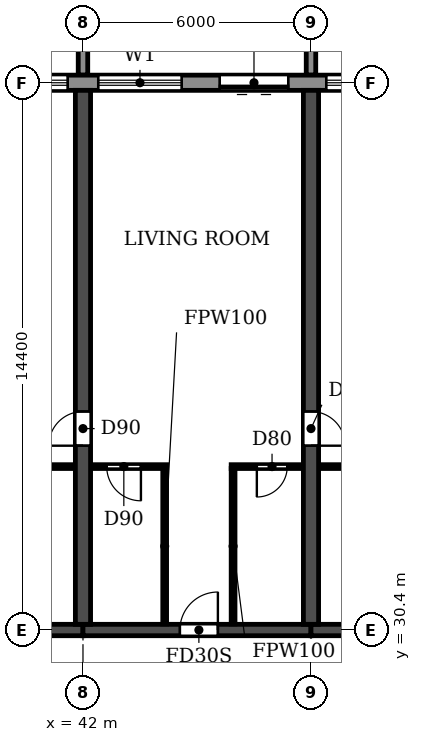
"""IFC4 building model, lengths in metres.
Left out: names, types, materials, properties, quantities, classifications, styles, units other than length and angle.
Written with IfcOpenShell. Run it as: python <this file> out.ifc"""

import sys

from ifc_helpers import new_model, si_unit, direction, frame, frame_2d, origin, place, context, subcontext, project, spatial, polyline, rectangle, outline, extrude, source, transform, mapped, element, fill, save


model = new_model("IFC4")
c1 = context("Model", 3, precision=1e-05, world=origin(), true_north=direction((0.0, 1.0)))
c2 = subcontext(c1, "Body", "Model", "MODEL_VIEW")
j1 = project(units=[si_unit("LENGTHUNIT", "METRE"), si_unit("PLANEANGLEUNIT", "RADIAN")], contexts=[c1])
p1 = place(None, origin())
s1 = spatial("IfcSite", under=j1, at=p1, CompositionType="ELEMENT")
p2 = place(p1, origin())
s2 = spatial("IfcBuilding", under=s1, at=p2, CompositionType="ELEMENT")
p3 = place(p2, frame((0.0, 0.0, 43.2)))
s3 = spatial("IfcBuildingStorey", under=s2, at=p3, CompositionType="ELEMENT", Elevation=43.2)
p4 = place(p3, frame((42.0, 30.55, 0.0), z_axis=(0.0, 0.0, 1.0), x_axis=(0.0, 1.0, 0.0)))
e1 = element("IfcWall", 1, at=p4, inside=s3, PredefinedType="SHEAR", context=c2, shape_type="SweptSolid", body=[
    extrude(rectangle(XDim=14.05, YDim=0.4, at=frame_2d((7.025, 0.0))), origin(), (0.0, 0.0, 1.0), 3.05),
])
p5 = place(p4, frame((4.7, 0.0, 0.0)))
e2 = element("IfcOpeningElement", 2, at=p5, cuts=e1, PredefinedType="OPENING", context=c2, shape_type="SweptSolid", body=[
    extrude(rectangle(XDim=0.9, YDim=2.1, at=frame_2d((0.45, 1.05))), frame((0.0, 0.21, 0.0), z_axis=(0.0, -1.0, 0.0), x_axis=(1.0, 0.0, 0.0)), (0.0, 0.0, 1.0), 0.42),
])
p6 = place(p3, frame((48.0, 30.55, 0.0), z_axis=(0.0, 0.0, 1.0), x_axis=(0.0, 1.0, 0.0)))
e3 = element("IfcWall", 3, at=p6, inside=s3, PredefinedType="SHEAR", context=c2, shape_type="SweptSolid", body=[
    extrude(rectangle(XDim=14.05, YDim=0.4, at=frame_2d((7.025, 0.0))), origin(), (0.0, 0.0, 1.0), 3.05),
])
p7 = place(p6, frame((4.7, 0.0, 0.0)))
e4 = element("IfcOpeningElement", 4, at=p7, cuts=e3, PredefinedType="OPENING", context=c2, shape_type="SweptSolid", body=[
    extrude(rectangle(XDim=0.9, YDim=2.1, at=frame_2d((0.45, 1.05))), frame((0.0, 0.21, 0.0), z_axis=(0.0, -1.0, 0.0), x_axis=(1.0, 0.0, 0.0)), (0.0, 0.0, 1.0), 0.42),
])
p8 = place(p3, frame((36.0, 30.4, 0.0), z_axis=(0.0, 0.0, 1.0), x_axis=(1.0, 0.0, 0.0)))
e5 = element("IfcWall", 5, at=p8, inside=s3, PredefinedType="SHEAR", context=c2, shape_type="SweptSolid", body=[
    extrude(rectangle(XDim=6.0, YDim=0.3, at=frame_2d((3.0, 0.0))), origin(), (0.0, 0.0, 1.0), 2.45),
])
p9 = place(p3, frame((42.0, 30.4, 0.0), z_axis=(0.0, 0.0, 1.0), x_axis=(1.0, 0.0, 0.0)))
e6 = element("IfcWall", 6, at=p9, inside=s3, PredefinedType="SHEAR", context=c2, shape_type="SweptSolid", body=[
    extrude(rectangle(XDim=6.0, YDim=0.3, at=frame_2d((3.0, 0.0))), origin(), (0.0, 0.0, 1.0), 2.45),
])
p10 = place(p9, frame((2.55, 0.0, 0.0)))
e7 = element("IfcOpeningElement", 7, at=p10, cuts=e6, PredefinedType="OPENING", context=c2, shape_type="SweptSolid", body=[
    extrude(rectangle(XDim=1.0, YDim=2.1, at=frame_2d((0.5, 1.05))), frame((0.0, 0.16, 0.0), z_axis=(0.0, -1.0, 0.0), x_axis=(1.0, 0.0, 0.0)), (0.0, 0.0, 1.0), 0.32),
])
p11 = place(p3, frame((48.0, 30.4, 0.0), z_axis=(0.0, 0.0, 1.0), x_axis=(1.0, 0.0, 0.0)))
e8 = element("IfcWall", 8, at=p11, inside=s3, PredefinedType="SHEAR", context=c2, shape_type="SweptSolid", body=[
    extrude(rectangle(XDim=6.0, YDim=0.3, at=frame_2d((3.0, 0.0))), origin(), (0.0, 0.0, 1.0), 2.45),
])
p12 = place(p3, frame((97.317, 44.8, 0.0), z_axis=(0.0, 0.0, 1.0), x_axis=(-1.0, 0.0, 0.0)))
e9 = element("IfcWall", 9, at=p12, inside=s3, PredefinedType="STANDARD", context=c2, shape_type="SweptSolid", body=[
    extrude(rectangle(XDim=92.634, YDim=0.4, at=frame_2d((46.317, 0.0))), origin(), (0.0, 0.0, 1.0), 3.05),
])
p13 = place(p12, frame((88.917, 0.0, 0.0)))
e10 = element("IfcOpeningElement", 10, at=p13, cuts=e9, PredefinedType="OPENING", context=c2, shape_type="SweptSolid", body=[
    extrude(rectangle(XDim=1.8, YDim=2.4, at=frame_2d((0.9, 1.2))), frame((0.0, 0.21, 0.0), z_axis=(0.0, -1.0, 0.0), x_axis=(1.0, 0.0, 0.0)), (0.0, 0.0, 1.0), 0.42),
])
p14 = place(p12, frame((85.717, 0.0, 0.9)))
e11 = element("IfcOpeningElement", 11, at=p14, cuts=e9, PredefinedType="OPENING", context=c2, shape_type="SweptSolid", body=[
    extrude(rectangle(XDim=2.2, YDim=1.5, at=frame_2d((1.1, 0.75))), frame((0.0, 0.21, 0.0), z_axis=(0.0, -1.0, 0.0), x_axis=(1.0, 0.0, 0.0)), (0.0, 0.0, 1.0), 0.42),
])
p15 = place(p12, frame((82.717, 0.0, 0.9)))
e12 = element("IfcOpeningElement", 12, at=p15, cuts=e9, PredefinedType="OPENING", context=c2, shape_type="SweptSolid", body=[
    extrude(rectangle(XDim=2.2, YDim=1.5, at=frame_2d((1.1, 0.75))), frame((0.0, 0.21, 0.0), z_axis=(0.0, -1.0, 0.0), x_axis=(1.0, 0.0, 0.0)), (0.0, 0.0, 1.0), 0.42),
])
p16 = place(p12, frame((79.717, 0.0, 0.9)))
e13 = element("IfcOpeningElement", 13, at=p16, cuts=e9, PredefinedType="OPENING", context=c2, shape_type="SweptSolid", body=[
    extrude(rectangle(XDim=2.2, YDim=1.5, at=frame_2d((1.1, 0.75))), frame((0.0, 0.21, 0.0), z_axis=(0.0, -1.0, 0.0), x_axis=(1.0, 0.0, 0.0)), (0.0, 0.0, 1.0), 0.42),
])
p17 = place(p12, frame((76.717, 0.0, 0.9)))
e14 = element("IfcOpeningElement", 14, at=p17, cuts=e9, PredefinedType="OPENING", context=c2, shape_type="SweptSolid", body=[
    extrude(rectangle(XDim=2.2, YDim=1.5, at=frame_2d((1.1, 0.75))), frame((0.0, 0.21, 0.0), z_axis=(0.0, -1.0, 0.0), x_axis=(1.0, 0.0, 0.0)), (0.0, 0.0, 1.0), 0.42),
])
p18 = place(p12, frame((73.917, 0.0, 0.0)))
e15 = element("IfcOpeningElement", 15, at=p18, cuts=e9, PredefinedType="OPENING", context=c2, shape_type="SweptSolid", body=[
    extrude(rectangle(XDim=1.8, YDim=2.4, at=frame_2d((0.9, 1.2))), frame((0.0, 0.21, 0.0), z_axis=(0.0, -1.0, 0.0), x_axis=(1.0, 0.0, 0.0)), (0.0, 0.0, 1.0), 0.42),
])
p19 = place(p12, frame((70.717, 0.0, 0.9)))
e16 = element("IfcOpeningElement", 16, at=p19, cuts=e9, PredefinedType="OPENING", context=c2, shape_type="SweptSolid", body=[
    extrude(rectangle(XDim=2.2, YDim=1.5, at=frame_2d((1.1, 0.75))), frame((0.0, 0.21, 0.0), z_axis=(0.0, -1.0, 0.0), x_axis=(1.0, 0.0, 0.0)), (0.0, 0.0, 1.0), 0.42),
])
p20 = place(p12, frame((67.717, 0.0, 0.9)))
e17 = element("IfcOpeningElement", 17, at=p20, cuts=e9, PredefinedType="OPENING", context=c2, shape_type="SweptSolid", body=[
    extrude(rectangle(XDim=2.2, YDim=1.5, at=frame_2d((1.1, 0.75))), frame((0.0, 0.21, 0.0), z_axis=(0.0, -1.0, 0.0), x_axis=(1.0, 0.0, 0.0)), (0.0, 0.0, 1.0), 0.42),
])
p21 = place(p12, frame((64.717, 0.0, 0.9)))
e18 = element("IfcOpeningElement", 18, at=p21, cuts=e9, PredefinedType="OPENING", context=c2, shape_type="SweptSolid", body=[
    extrude(rectangle(XDim=2.2, YDim=1.5, at=frame_2d((1.1, 0.75))), frame((0.0, 0.21, 0.0), z_axis=(0.0, -1.0, 0.0), x_axis=(1.0, 0.0, 0.0)), (0.0, 0.0, 1.0), 0.42),
])
p22 = place(p12, frame((61.917, 0.0, 0.0)))
e19 = element("IfcOpeningElement", 19, at=p22, cuts=e9, PredefinedType="OPENING", context=c2, shape_type="SweptSolid", body=[
    extrude(rectangle(XDim=1.8, YDim=2.4, at=frame_2d((0.9, 1.2))), frame((0.0, 0.21, 0.0), z_axis=(0.0, -1.0, 0.0), x_axis=(1.0, 0.0, 0.0)), (0.0, 0.0, 1.0), 0.42),
])
p23 = place(p12, frame((58.717, 0.0, 0.9)))
e20 = element("IfcOpeningElement", 20, at=p23, cuts=e9, PredefinedType="OPENING", context=c2, shape_type="SweptSolid", body=[
    extrude(rectangle(XDim=2.2, YDim=1.5, at=frame_2d((1.1, 0.75))), frame((0.0, 0.21, 0.0), z_axis=(0.0, -1.0, 0.0), x_axis=(1.0, 0.0, 0.0)), (0.0, 0.0, 1.0), 0.42),
])
p24 = place(p12, frame((55.717, 0.0, 0.9)))
e21 = element("IfcOpeningElement", 21, at=p24, cuts=e9, PredefinedType="OPENING", context=c2, shape_type="SweptSolid", body=[
    extrude(rectangle(XDim=2.2, YDim=1.5, at=frame_2d((1.1, 0.75))), frame((0.0, 0.21, 0.0), z_axis=(0.0, -1.0, 0.0), x_axis=(1.0, 0.0, 0.0)), (0.0, 0.0, 1.0), 0.42),
])
p25 = place(p12, frame((52.717, 0.0, 0.9)))
e22 = element("IfcOpeningElement", 22, at=p25, cuts=e9, PredefinedType="OPENING", context=c2, shape_type="SweptSolid", body=[
    extrude(rectangle(XDim=2.2, YDim=1.5, at=frame_2d((1.1, 0.75))), frame((0.0, 0.21, 0.0), z_axis=(0.0, -1.0, 0.0), x_axis=(1.0, 0.0, 0.0)), (0.0, 0.0, 1.0), 0.42),
])
p26 = place(p12, frame((49.917, 0.0, 0.0)))
e23 = element("IfcOpeningElement", 23, at=p26, cuts=e9, PredefinedType="OPENING", context=c2, shape_type="SweptSolid", body=[
    extrude(rectangle(XDim=1.8, YDim=2.4, at=frame_2d((0.9, 1.2))), frame((0.0, 0.21, 0.0), z_axis=(0.0, -1.0, 0.0), x_axis=(1.0, 0.0, 0.0)), (0.0, 0.0, 1.0), 0.42),
])
p27 = place(p12, frame((46.717, 0.0, 0.9)))
e24 = element("IfcOpeningElement", 24, at=p27, cuts=e9, PredefinedType="OPENING", context=c2, shape_type="SweptSolid", body=[
    extrude(rectangle(XDim=2.2, YDim=1.5, at=frame_2d((1.1, 0.75))), frame((0.0, 0.21, 0.0), z_axis=(0.0, -1.0, 0.0), x_axis=(1.0, 0.0, 0.0)), (0.0, 0.0, 1.0), 0.42),
])
p28 = place(p12, frame((43.717, 0.0, 0.9)))
e25 = element("IfcOpeningElement", 25, at=p28, cuts=e9, PredefinedType="OPENING", context=c2, shape_type="SweptSolid", body=[
    extrude(rectangle(XDim=2.2, YDim=1.5, at=frame_2d((1.1, 0.75))), frame((0.0, 0.21, 0.0), z_axis=(0.0, -1.0, 0.0), x_axis=(1.0, 0.0, 0.0)), (0.0, 0.0, 1.0), 0.42),
])
p29 = place(p12, frame((40.717, 0.0, 0.9)))
e26 = element("IfcOpeningElement", 26, at=p29, cuts=e9, PredefinedType="OPENING", context=c2, shape_type="SweptSolid", body=[
    extrude(rectangle(XDim=2.2, YDim=1.5, at=frame_2d((1.1, 0.75))), frame((0.0, 0.21, 0.0), z_axis=(0.0, -1.0, 0.0), x_axis=(1.0, 0.0, 0.0)), (0.0, 0.0, 1.0), 0.42),
])
p30 = place(p12, frame((37.917, 0.0, 0.0)))
e27 = element("IfcOpeningElement", 27, at=p30, cuts=e9, PredefinedType="OPENING", context=c2, shape_type="SweptSolid", body=[
    extrude(rectangle(XDim=1.8, YDim=2.4, at=frame_2d((0.9, 1.2))), frame((0.0, 0.21, 0.0), z_axis=(0.0, -1.0, 0.0), x_axis=(1.0, 0.0, 0.0)), (0.0, 0.0, 1.0), 0.42),
])
p31 = place(p12, frame((34.717, 0.0, 0.9)))
e28 = element("IfcOpeningElement", 28, at=p31, cuts=e9, PredefinedType="OPENING", context=c2, shape_type="SweptSolid", body=[
    extrude(rectangle(XDim=2.2, YDim=1.5, at=frame_2d((1.1, 0.75))), frame((0.0, 0.21, 0.0), z_axis=(0.0, -1.0, 0.0), x_axis=(1.0, 0.0, 0.0)), (0.0, 0.0, 1.0), 0.42),
])
p32 = place(p12, frame((31.717, 0.0, 0.9)))
e29 = element("IfcOpeningElement", 29, at=p32, cuts=e9, PredefinedType="OPENING", context=c2, shape_type="SweptSolid", body=[
    extrude(rectangle(XDim=2.2, YDim=1.5, at=frame_2d((1.1, 0.75))), frame((0.0, 0.21, 0.0), z_axis=(0.0, -1.0, 0.0), x_axis=(1.0, 0.0, 0.0)), (0.0, 0.0, 1.0), 0.42),
])
p33 = place(p12, frame((28.717, 0.0, 0.9)))
e30 = element("IfcOpeningElement", 30, at=p33, cuts=e9, PredefinedType="OPENING", context=c2, shape_type="SweptSolid", body=[
    extrude(rectangle(XDim=2.2, YDim=1.5, at=frame_2d((1.1, 0.75))), frame((0.0, 0.21, 0.0), z_axis=(0.0, -1.0, 0.0), x_axis=(1.0, 0.0, 0.0)), (0.0, 0.0, 1.0), 0.42),
])
p34 = place(p12, frame((25.917, 0.0, 0.0)))
e31 = element("IfcOpeningElement", 31, at=p34, cuts=e9, PredefinedType="OPENING", context=c2, shape_type="SweptSolid", body=[
    extrude(rectangle(XDim=1.8, YDim=2.4, at=frame_2d((0.9, 1.2))), frame((0.0, 0.21, 0.0), z_axis=(0.0, -1.0, 0.0), x_axis=(1.0, 0.0, 0.0)), (0.0, 0.0, 1.0), 0.42),
])
p35 = place(p12, frame((22.917, 0.0, 0.0)))
e32 = element("IfcOpeningElement", 32, at=p35, cuts=e9, PredefinedType="OPENING", context=c2, shape_type="SweptSolid", body=[
    extrude(rectangle(XDim=1.8, YDim=2.4, at=frame_2d((0.9, 1.2))), frame((0.0, 0.21, 0.0), z_axis=(0.0, -1.0, 0.0), x_axis=(1.0, 0.0, 0.0)), (0.0, 0.0, 1.0), 0.42),
])
p36 = place(p12, frame((19.717, 0.0, 0.9)))
e33 = element("IfcOpeningElement", 33, at=p36, cuts=e9, PredefinedType="OPENING", context=c2, shape_type="SweptSolid", body=[
    extrude(rectangle(XDim=2.2, YDim=1.5, at=frame_2d((1.1, 0.75))), frame((0.0, 0.21, 0.0), z_axis=(0.0, -1.0, 0.0), x_axis=(1.0, 0.0, 0.0)), (0.0, 0.0, 1.0), 0.42),
])
p37 = place(p12, frame((16.717, 0.0, 0.9)))
e34 = element("IfcOpeningElement", 34, at=p37, cuts=e9, PredefinedType="OPENING", context=c2, shape_type="SweptSolid", body=[
    extrude(rectangle(XDim=2.2, YDim=1.5, at=frame_2d((1.1, 0.75))), frame((0.0, 0.21, 0.0), z_axis=(0.0, -1.0, 0.0), x_axis=(1.0, 0.0, 0.0)), (0.0, 0.0, 1.0), 0.42),
])
p38 = place(p12, frame((13.717, 0.0, 0.9)))
e35 = element("IfcOpeningElement", 35, at=p38, cuts=e9, PredefinedType="OPENING", context=c2, shape_type="SweptSolid", body=[
    extrude(rectangle(XDim=2.2, YDim=1.5, at=frame_2d((1.1, 0.75))), frame((0.0, 0.21, 0.0), z_axis=(0.0, -1.0, 0.0), x_axis=(1.0, 0.0, 0.0)), (0.0, 0.0, 1.0), 0.42),
])
p39 = place(p12, frame((10.717, 0.0, 0.9)))
e36 = element("IfcOpeningElement", 36, at=p39, cuts=e9, PredefinedType="OPENING", context=c2, shape_type="SweptSolid", body=[
    extrude(rectangle(XDim=2.2, YDim=1.5, at=frame_2d((1.1, 0.75))), frame((0.0, 0.21, 0.0), z_axis=(0.0, -1.0, 0.0), x_axis=(1.0, 0.0, 0.0)), (0.0, 0.0, 1.0), 0.42),
])
p40 = place(p12, frame((7.917, 0.0, 0.0)))
e37 = element("IfcOpeningElement", 37, at=p40, cuts=e9, PredefinedType="OPENING", context=c2, shape_type="SweptSolid", body=[
    extrude(rectangle(XDim=1.8, YDim=2.4, at=frame_2d((0.9, 1.2))), frame((0.0, 0.21, 0.0), z_axis=(0.0, -1.0, 0.0), x_axis=(1.0, 0.0, 0.0)), (0.0, 0.0, 1.0), 0.42),
])
p41 = place(p12, frame((4.717, 0.0, 0.9)))
e38 = element("IfcOpeningElement", 38, at=p41, cuts=e9, PredefinedType="OPENING", context=c2, shape_type="SweptSolid", body=[
    extrude(rectangle(XDim=2.2, YDim=1.5, at=frame_2d((1.1, 0.75))), frame((0.0, 0.21, 0.0), z_axis=(0.0, -1.0, 0.0), x_axis=(1.0, 0.0, 0.0)), (0.0, 0.0, 1.0), 0.42),
])
p42 = place(p12, frame((1.917, 0.0, 0.0)))
e39 = element("IfcOpeningElement", 39, at=p42, cuts=e9, PredefinedType="OPENING", context=c2, shape_type="SweptSolid", body=[
    extrude(rectangle(XDim=1.8, YDim=2.4, at=frame_2d((0.9, 1.2))), frame((0.0, 0.21, 0.0), z_axis=(0.0, -1.0, 0.0), x_axis=(1.0, 0.0, 0.0)), (0.0, 0.0, 1.0), 0.42),
])
m1 = source(origin(), c2, "Body", "SweptSolid", [
    extrude(outline(polyline([(0.0, 0.0), (0.25, 0.0), (0.25, 3.1), (0.0, 3.1), (0.0, 0.0)])), origin(), (0.0, 0.0, 1.0), 3.1),
])
for number, where in (
    (40, (41.875, 45.0, 0.0)),
    (41, (47.875, 45.0, 0.0)),
):
    element("IfcWall", number, at=place(p3, frame(where)), inside=s3, PredefinedType="STANDARD", context=c2, shape_type="MappedRepresentation", body=[
        mapped(m1, transform((0.0, 0.0, 0.0))),
    ])
p43 = place(p3, frame((39.1, 34.7, 0.0), z_axis=(0.0, 0.0, 1.0), x_axis=(1.0, 0.0, 0.0)))
e42 = element("IfcWall", 42, at=p43, inside=s3, PredefinedType="PARTITIONING", context=c2, shape_type="SweptSolid", body=[
    extrude(rectangle(XDim=2.69, YDim=0.1, at=frame_2d((1.345, 0.0))), origin(), (0.0, 0.0, 1.0), 3.05),
])
p44 = place(p43, frame((1.0, 0.0, 0.0)))
e43 = element("IfcOpeningElement", 43, at=p44, cuts=e42, PredefinedType="OPENING", context=c2, shape_type="SweptSolid", body=[
    extrude(rectangle(XDim=0.8, YDim=2.1, at=frame_2d((0.4, 1.05))), frame((0.0, 0.06, 0.0), z_axis=(0.0, -1.0, 0.0), x_axis=(1.0, 0.0, 0.0)), (0.0, 0.0, 1.0), 0.12),
])
p45 = place(p3, frame((42.21, 34.7, 0.0), z_axis=(0.0, 0.0, 1.0), x_axis=(1.0, 0.0, 0.0)))
e44 = element("IfcWall", 44, at=p45, inside=s3, PredefinedType="PARTITIONING", context=c2, shape_type="SweptSolid", body=[
    extrude(rectangle(XDim=1.99, YDim=0.1, at=frame_2d((0.995, 0.0))), origin(), (0.0, 0.0, 1.0), 3.05),
])
p46 = place(p45, frame((0.415, 0.0, 0.0)))
e45 = element("IfcOpeningElement", 45, at=p46, cuts=e44, PredefinedType="OPENING", context=c2, shape_type="SweptSolid", body=[
    extrude(rectangle(XDim=0.9, YDim=2.1, at=frame_2d((0.45, 1.05))), frame((0.0, 0.06, 0.0), z_axis=(0.0, -1.0, 0.0), x_axis=(1.0, 0.0, 0.0)), (0.0, 0.0, 1.0), 0.12),
])
p47 = place(p3, frame((45.9, 34.7, 0.0), z_axis=(0.0, 0.0, 1.0), x_axis=(1.0, 0.0, 0.0)))
e46 = element("IfcWall", 46, at=p47, inside=s3, PredefinedType="PARTITIONING", context=c2, shape_type="SweptSolid", body=[
    extrude(rectangle(XDim=1.89, YDim=0.1, at=frame_2d((0.945, 0.0))), origin(), (0.0, 0.0, 1.0), 3.05),
])
p48 = place(p47, frame((0.675, 0.0, 0.0)))
e47 = element("IfcOpeningElement", 47, at=p48, cuts=e46, PredefinedType="OPENING", context=c2, shape_type="SweptSolid", body=[
    extrude(rectangle(XDim=0.8, YDim=2.1, at=frame_2d((0.4, 1.05))), frame((0.0, 0.06, 0.0), z_axis=(0.0, -1.0, 0.0), x_axis=(1.0, 0.0, 0.0)), (0.0, 0.0, 1.0), 0.12),
])
p49 = place(p3, frame((48.21, 34.7, 0.0), z_axis=(0.0, 0.0, 1.0), x_axis=(1.0, 0.0, 0.0)))
e48 = element("IfcWall", 48, at=p49, inside=s3, PredefinedType="PARTITIONING", context=c2, shape_type="SweptSolid", body=[
    extrude(rectangle(XDim=2.69, YDim=0.1, at=frame_2d((1.345, 0.0))), origin(), (0.0, 0.0, 1.0), 3.05),
])
p50 = place(p49, frame((0.89, 0.0, 0.0)))
e49 = element("IfcOpeningElement", 49, at=p50, cuts=e48, PredefinedType="OPENING", context=c2, shape_type="SweptSolid", body=[
    extrude(rectangle(XDim=0.8, YDim=2.1, at=frame_2d((0.4, 1.05))), frame((0.0, 0.06, 0.0), z_axis=(0.0, -1.0, 0.0), x_axis=(1.0, 0.0, 0.0)), (0.0, 0.0, 1.0), 0.12),
])
for number, where, z_axis, x_axis in (
    (50, (44.15, 30.56, 0.0), (0.0, 0.0, 1.0), (0.0, 1.0, 0.0)),
    (51, (45.95, 30.56, 0.0), (0.0, 0.0, 1.0), (0.0, 1.0, 0.0)),
):
    element("IfcWall", number, at=place(p3, frame(where, z_axis=z_axis, x_axis=x_axis)), inside=s3, PredefinedType="PARTITIONING", context=c2, shape_type="SweptSolid", body=[
        extrude(rectangle(XDim=4.09, YDim=0.1, at=frame_2d((2.045, 0.0))), origin(), (0.0, 0.0, 1.0), 3.05),
    ])
p51 = place(p24, origin())
e52 = element("IfcWindow", 52, at=p51, inside=s3, PartitioningType="DOUBLE_PANEL_HORIZONTAL", PredefinedType="WINDOW", context=c2, shape_type="SweptSolid", body=[
    extrude(rectangle(XDim=2.2, YDim=1.5, at=frame_2d((1.1, 0.75))), frame((0.0, 0.03, 0.0), z_axis=(0.0, -1.0, 0.0), x_axis=(1.0, 0.0, 0.0)), (0.0, 0.0, 1.0), 0.06),
])
fill(e21, e52)
p52 = place(p25, origin())
e53 = element("IfcWindow", 53, at=p52, inside=s3, PartitioningType="DOUBLE_PANEL_HORIZONTAL", PredefinedType="WINDOW", context=c2, shape_type="SweptSolid", body=[
    extrude(rectangle(XDim=2.2, YDim=1.5, at=frame_2d((1.1, 0.75))), frame((0.0, 0.03, 0.0), z_axis=(0.0, -1.0, 0.0), x_axis=(1.0, 0.0, 0.0)), (0.0, 0.0, 1.0), 0.06),
])
fill(e22, e53)
p53 = place(p26, origin())
e54 = element("IfcDoor", 54, at=p53, inside=s3, OperationType="DOUBLE_DOOR_SLIDING", PredefinedType="DOOR", context=c2, shape_type="SweptSolid", body=[
    extrude(rectangle(XDim=1.8, YDim=2.4, at=frame_2d((0.9, 1.2))), frame((0.0, 0.025, 0.0), z_axis=(0.0, -1.0, 0.0), x_axis=(1.0, 0.0, 0.0)), (0.0, 0.0, 1.0), 0.05),
])
fill(e23, e54)
p54 = place(p27, origin())
e55 = element("IfcWindow", 55, at=p54, inside=s3, PartitioningType="DOUBLE_PANEL_HORIZONTAL", PredefinedType="WINDOW", context=c2, shape_type="SweptSolid", body=[
    extrude(rectangle(XDim=2.2, YDim=1.5, at=frame_2d((1.1, 0.75))), frame((0.0, 0.03, 0.0), z_axis=(0.0, -1.0, 0.0), x_axis=(1.0, 0.0, 0.0)), (0.0, 0.0, 1.0), 0.06),
])
fill(e24, e55)
p55 = place(p5, origin())
e56 = element("IfcDoor", 56, at=p55, inside=s3, OperationType="SINGLE_SWING_LEFT", PredefinedType="DOOR", context=c2, shape_type="SweptSolid", body=[
    extrude(rectangle(XDim=0.9, YDim=2.1, at=frame_2d((0.45, 1.05))), frame((0.0, 0.025, 0.0), z_axis=(0.0, -1.0, 0.0), x_axis=(1.0, 0.0, 0.0)), (0.0, 0.0, 1.0), 0.05),
])
fill(e2, e56)
p56 = place(p46, frame((0.9, 0.0, 0.0), z_axis=(0.0, 0.0, 1.0), x_axis=(-1.0, 0.0, 0.0)))
e57 = element("IfcDoor", 57, at=p56, inside=s3, OperationType="SINGLE_SWING_LEFT", PredefinedType="DOOR", context=c2, shape_type="SweptSolid", body=[
    extrude(rectangle(XDim=0.9, YDim=2.1, at=frame_2d((0.45, 1.05))), frame((0.0, 0.025, 0.0), z_axis=(0.0, -1.0, 0.0), x_axis=(1.0, 0.0, 0.0)), (0.0, 0.0, 1.0), 0.05),
])
fill(e45, e57)
p57 = place(p10, origin())
e58 = element("IfcDoor", 58, at=p57, inside=s3, OperationType="SINGLE_SWING_RIGHT", PredefinedType="DOOR", context=c2, shape_type="SweptSolid", body=[
    extrude(rectangle(XDim=1.0, YDim=2.1, at=frame_2d((0.5, 1.05))), frame((0.0, 0.025, 0.0), z_axis=(0.0, -1.0, 0.0), x_axis=(1.0, 0.0, 0.0)), (0.0, 0.0, 1.0), 0.05),
])
fill(e7, e58)
p58 = place(p48, frame((0.8, 0.0, 0.0), z_axis=(0.0, 0.0, 1.0), x_axis=(-1.0, 0.0, 0.0)))
e59 = element("IfcDoor", 59, at=p58, inside=s3, OperationType="SINGLE_SWING_RIGHT", PredefinedType="DOOR", context=c2, shape_type="SweptSolid", body=[
    extrude(rectangle(XDim=0.8, YDim=2.1, at=frame_2d((0.4, 1.05))), frame((0.0, 0.025, 0.0), z_axis=(0.0, -1.0, 0.0), x_axis=(1.0, 0.0, 0.0)), (0.0, 0.0, 1.0), 0.05),
])
fill(e47, e59)
p59 = place(p7, frame((0.9, 0.0, 0.0), z_axis=(0.0, 0.0, 1.0), x_axis=(-1.0, 0.0, 0.0)))
e60 = element("IfcDoor", 60, at=p59, inside=s3, OperationType="SINGLE_SWING_RIGHT", PredefinedType="DOOR", context=c2, shape_type="SweptSolid", body=[
    extrude(rectangle(XDim=0.9, YDim=2.1, at=frame_2d((0.45, 1.05))), frame((0.0, 0.025, 0.0), z_axis=(0.0, -1.0, 0.0), x_axis=(1.0, 0.0, 0.0)), (0.0, 0.0, 1.0), 0.05),
])
fill(e4, e60)
save(model, sys.argv[1])
